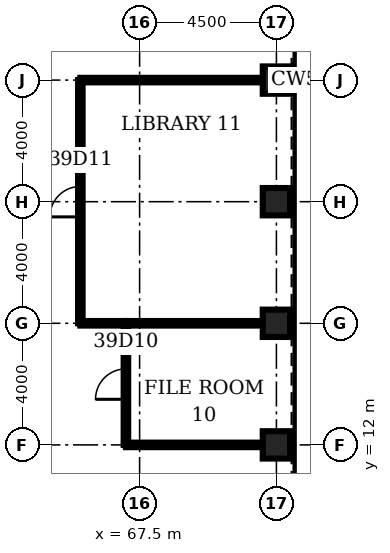
"""IFC4 building model, lengths in metres.
Left out: names, types, materials, properties, quantities, classifications, styles, units other than length and angle.
Written with IfcOpenShell. Run it as: python <this file> out.ifc"""

import sys

from ifc_helpers import new_model, si_unit, direction, frame, frame_2d, origin, origin_2d, place, context, subcontext, project, spatial, rectangle, hollow_rectangle, extrude, element, fill, save


model = new_model("IFC4")
c1 = context("Model", 3, precision=1e-05, world=origin(), true_north=direction((0.0, 1.0)))
c2 = subcontext(c1, "Body", "Model", "MODEL_VIEW")
j1 = project(units=[si_unit("LENGTHUNIT", "METRE"), si_unit("PLANEANGLEUNIT", "RADIAN")], contexts=[c1])
p1 = place(None, origin())
s1 = spatial("IfcSite", under=j1, at=p1, CompositionType="ELEMENT")
p2 = place(p1, origin())
s2 = spatial("IfcBuilding", under=s1, at=p2, CompositionType="ELEMENT")
p3 = place(p2, frame((0.0, 0.0, 176.1)))
s3 = spatial("IfcBuildingStorey", under=s2, at=p3, CompositionType="ELEMENT", Elevation=176.1)
for number, where, z_axis, x_axis in (
    (1, (72.0, 12.0, 0.0), (0.0, 0.0, 1.0), (1.0, 0.0, 0.0)),
    (2, (72.0, 16.0, 0.0), (0.0, 0.0, 1.0), (1.0, 0.0, 0.0)),
    (3, (72.0, 20.0, 0.0), (0.0, 0.0, 1.0), (1.0, 0.0, 0.0)),
    (4, (72.0, 24.0, 0.0), (0.0, 0.0, 1.0), (1.0, 0.0, 0.0)),
):
    element("IfcColumn", number, at=place(p3, frame(where, z_axis=z_axis, x_axis=x_axis)), inside=s3, PredefinedType="COLUMN", context=c2, shape_type="SweptSolid", body=[
        extrude(hollow_rectangle(XDim=0.9, YDim=0.9, WallThickness=0.09, at=origin_2d()), origin(), (0.0, 0.0, 1.0), 4.2),
    ])
p4 = place(p3, frame((67.05, 12.0, 0.0), z_axis=(0.0, 0.0, 1.0), x_axis=(1.0, 0.0, 0.0)))
e5 = element("IfcWall", 5, at=p4, inside=s3, PredefinedType="PARTITIONING", context=c2, shape_type="SweptSolid", body=[
    extrude(rectangle(XDim=4.5, YDim=0.15, at=frame_2d((2.25, 0.0))), origin(), (0.0, 0.0, 1.0), 3.0),
])
p5 = place(p3, frame((65.55, 16.0, 0.0), z_axis=(0.0, 0.0, 1.0), x_axis=(1.0, 0.0, 0.0)))
e6 = element("IfcWall", 6, at=p5, inside=s3, PredefinedType="PARTITIONING", context=c2, shape_type="SweptSolid", body=[
    extrude(rectangle(XDim=1.5, YDim=0.15, at=frame_2d((0.75, 0.0))), origin(), (0.0, 0.0, 1.0), 2.93),
])
p6 = place(p3, frame((67.05, 16.0, 0.0), z_axis=(0.0, 0.0, 1.0), x_axis=(1.0, 0.0, 0.0)))
e7 = element("IfcWall", 7, at=p6, inside=s3, PredefinedType="PARTITIONING", context=c2, shape_type="SweptSolid", body=[
    extrude(rectangle(XDim=4.5, YDim=0.15, at=frame_2d((2.25, 0.0))), origin(), (0.0, 0.0, 1.0), 2.93),
])
p7 = place(p3, frame((65.55, 24.0, 0.0), z_axis=(0.0, 0.0, 1.0), x_axis=(1.0, 0.0, 0.0)))
e8 = element("IfcWall", 8, at=p7, inside=s3, PredefinedType="PARTITIONING", context=c2, shape_type="SweptSolid", body=[
    extrude(rectangle(XDim=6.0, YDim=0.15, at=frame_2d((3.0, 0.0))), origin(), (0.0, 0.0, 1.0), 3.0),
])
p8 = place(p3, frame((65.55, 16.0, 0.0), z_axis=(0.0, 0.0, 1.0), x_axis=(0.0, 1.0, 0.0)))
e9 = element("IfcWall", 9, at=p8, inside=s3, PredefinedType="PARTITIONING", context=c2, shape_type="SweptSolid", body=[
    extrude(rectangle(XDim=8.0, YDim=0.15, at=frame_2d((4.0, 0.0))), origin(), (0.0, 0.0, 1.0), 3.0),
])
p9 = place(p8, frame((3.5, 0.0, 0.0)))
e10 = element("IfcOpeningElement", 10, at=p9, cuts=e9, PredefinedType="OPENING", context=c2, shape_type="SweptSolid", body=[
    extrude(rectangle(XDim=1.0, YDim=2.1, at=frame_2d((0.5, 1.05))), frame((0.0, 0.085, 0.0), z_axis=(0.0, -1.0, 0.0), x_axis=(1.0, 0.0, 0.0)), (0.0, 0.0, 1.0), 0.17),
])
p10 = place(p3, frame((67.05, 12.0, 0.0), z_axis=(0.0, 0.0, 1.0), x_axis=(0.0, 1.0, 0.0)))
e11 = element("IfcWall", 11, at=p10, inside=s3, PredefinedType="PARTITIONING", context=c2, shape_type="SweptSolid", body=[
    extrude(rectangle(XDim=4.0, YDim=0.15, at=frame_2d((2.0, 0.0))), origin(), (0.0, 0.0, 1.0), 3.0),
])
p11 = place(p10, frame((1.5, 0.0, 0.0)))
e12 = element("IfcOpeningElement", 12, at=p11, cuts=e11, PredefinedType="OPENING", context=c2, shape_type="SweptSolid", body=[
    extrude(rectangle(XDim=1.0, YDim=2.1, at=frame_2d((0.5, 1.05))), frame((0.0, 0.085, 0.0), z_axis=(0.0, -1.0, 0.0), x_axis=(1.0, 0.0, 0.0)), (0.0, 0.0, 1.0), 0.17),
])
p12 = place(p11, origin())
e13 = element("IfcDoor", 13, at=p12, inside=s3, OperationType="SINGLE_SWING_LEFT", PredefinedType="DOOR", context=c2, shape_type="SweptSolid", body=[
    extrude(rectangle(XDim=1.0, YDim=2.1, at=frame_2d((0.5, 1.05))), frame((0.0, 0.025, 0.0), z_axis=(0.0, -1.0, 0.0), x_axis=(1.0, 0.0, 0.0)), (0.0, 0.0, 1.0), 0.05),
])
fill(e12, e13)
p13 = place(p9, origin())
e14 = element("IfcDoor", 14, at=p13, inside=s3, OperationType="SINGLE_SWING_LEFT", PredefinedType="DOOR", context=c2, shape_type="SweptSolid", body=[
    extrude(rectangle(XDim=1.0, YDim=2.1, at=frame_2d((0.5, 1.05))), frame((0.0, 0.025, 0.0), z_axis=(0.0, -1.0, 0.0), x_axis=(1.0, 0.0, 0.0)), (0.0, 0.0, 1.0), 0.05),
])
fill(e10, e14)
save(model, sys.argv[1])
